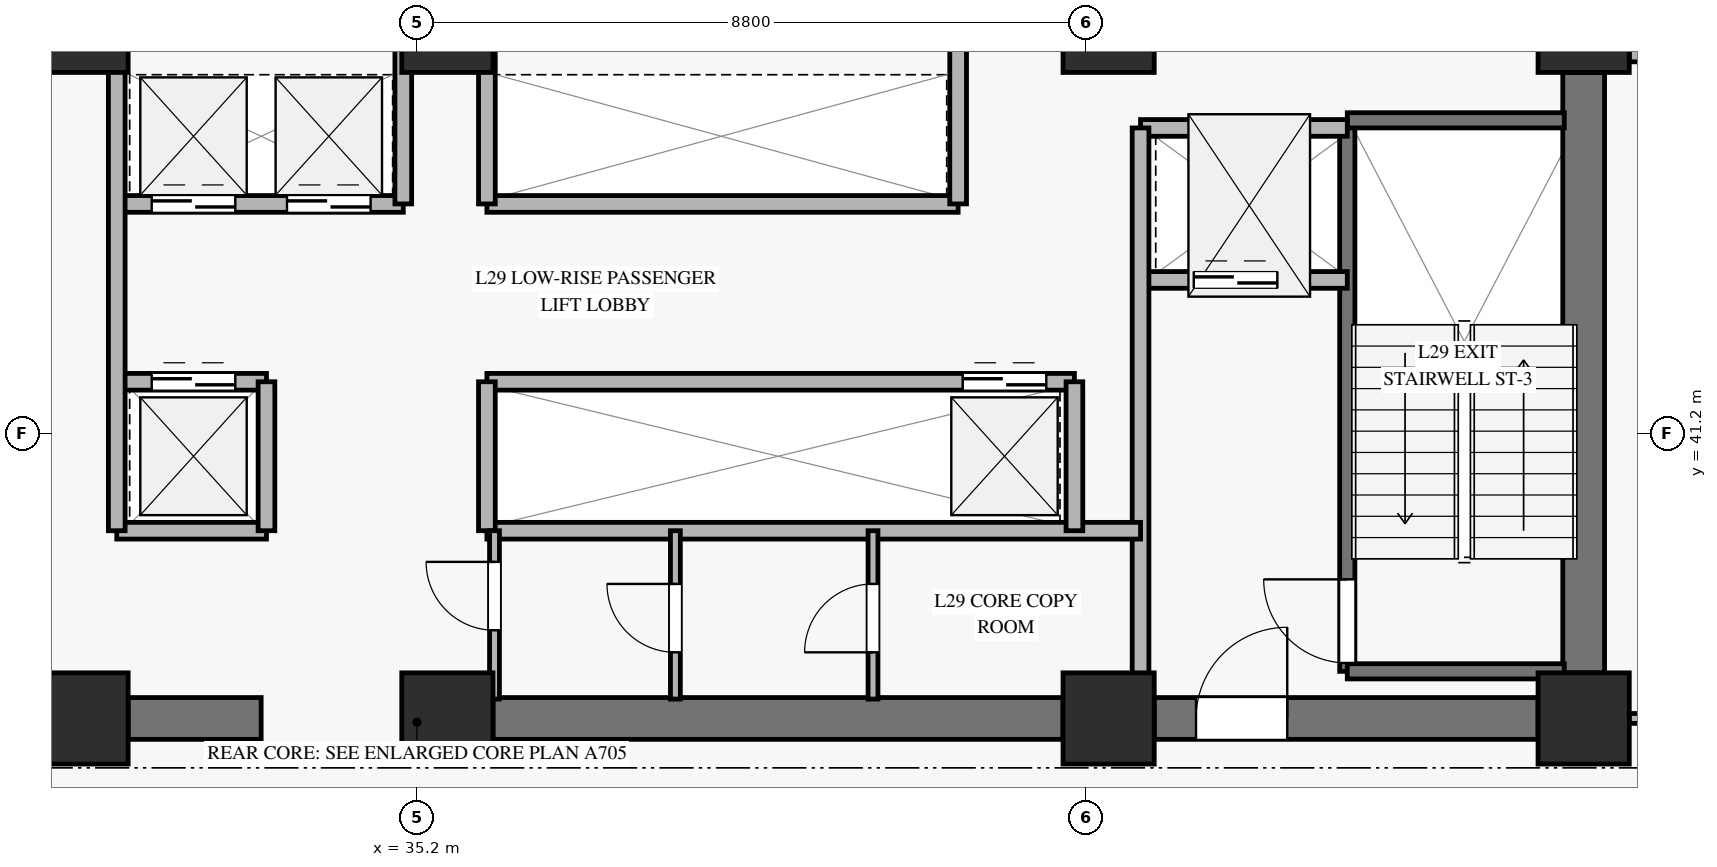
"""IFC4 building model, lengths in metres.
Left out: names, types, materials, properties, quantities, classifications, styles, units other than length and angle.
Written with IfcOpenShell. Run it as: python <this file> out.ifc"""

import sys

from ifc_helpers import new_model, si_unit, direction, frame, frame_2d, origin, origin_2d, place, context, subcontext, project, spatial, rectangle, extrude, source, transform, mapped, element, fill, save


model = new_model("IFC4")
c1 = context("Model", 3, precision=1e-05, world=origin(), true_north=direction((0.0, 1.0)))
c2 = subcontext(c1, "Body", "Model", "MODEL_VIEW")
j1 = project(units=[si_unit("LENGTHUNIT", "METRE"), si_unit("PLANEANGLEUNIT", "RADIAN")], contexts=[c1])
p1 = place(None, origin())
s1 = spatial("IfcSite", under=j1, at=p1, CompositionType="ELEMENT")
p2 = place(p1, origin())
s2 = spatial("IfcBuilding", under=s1, at=p2, CompositionType="ELEMENT")
p3 = place(p2, frame((0.0, 0.0, 119.2)))
s3 = spatial("IfcBuildingStorey", under=s2, at=p3, CompositionType="ELEMENT", Elevation=119.2)
m1 = source(origin(), c2, "Body", "SweptSolid", [
    extrude(rectangle(XDim=1.2, YDim=1.2, at=origin_2d()), origin(), (0.0, 0.0, 1.0), 3.68),
])
for number, where, z_axis, x_axis in (
    (1, (30.8, 37.45, 0.0), (0.0, 0.0, 1.0), (1.0, 0.0, 0.0)),
    (2, (30.8, 46.55, 0.0), (0.0, 0.0, 1.0), (1.0, 0.0, 0.0)),
    (3, (35.6, 37.45, 0.0), (0.0, 0.0, 1.0), (1.0, 0.0, 0.0)),
    (4, (35.6, 46.55, 0.0), (0.0, 0.0, 1.0), (1.0, 0.0, 0.0)),
    (5, (44.3, 37.45, 0.0), (0.0, 0.0, 1.0), (1.0, 0.0, 0.0)),
    (6, (44.3, 46.55, 0.0), (0.0, 0.0, 1.0), (1.0, 0.0, 0.0)),
    (7, (50.55, 37.45, 0.0), (0.0, 0.0, 1.0), (1.0, 0.0, 0.0)),
    (8, (50.55, 46.55, 0.0), (0.0, 0.0, 1.0), (1.0, 0.0, 0.0)),
):
    element("IfcColumn", number, at=place(p3, frame(where, z_axis=z_axis, x_axis=x_axis)), inside=s3, PredefinedType="PILASTER", context=c2, shape_type="MappedRepresentation", body=[
        mapped(m1, transform((0.0, 0.0, 0.0), x_axis=(1.0, 0.0, 0.0), y_axis=(0.0, 1.0, 0.0), z_axis=(0.0, 0.0, 1.0), scale=1.0)),
    ])
p4 = place(p3, frame((31.4, 37.45, 0.0), z_axis=(0.0, 0.0, 1.0), x_axis=(1.0, 0.0, 0.0)))
e9 = element("IfcWall", 9, at=p4, inside=s3, PredefinedType="SHEAR", context=c2, shape_type="SweptSolid", body=[
    extrude(rectangle(XDim=1.75, YDim=0.55, at=frame_2d((0.875, 0.0))), origin(), (0.0, 0.0, 1.0), 3.68),
])
p5 = place(p3, frame((36.2, 37.45, 0.0), z_axis=(0.0, 0.0, 1.0), x_axis=(1.0, 0.0, 0.0)))
e10 = element("IfcWall", 10, at=p5, inside=s3, PredefinedType="SHEAR", context=c2, shape_type="SweptSolid", body=[
    extrude(rectangle(XDim=7.5, YDim=0.55, at=frame_2d((3.75, 0.0))), origin(), (0.0, 0.0, 1.0), 3.68),
])
p6 = place(p3, frame((44.9, 37.45, 0.0), z_axis=(0.0, 0.0, 1.0), x_axis=(1.0, 0.0, 0.0)))
e11 = element("IfcWall", 11, at=p6, inside=s3, PredefinedType="SHEAR", context=c2, shape_type="SweptSolid", body=[
    extrude(rectangle(XDim=5.05, YDim=0.55, at=frame_2d((2.525, 0.0))), origin(), (0.0, 0.0, 1.0), 3.68),
])
p7 = place(p6, frame((0.55, 0.0, 0.0)))
e12 = element("IfcOpeningElement", 12, at=p7, cuts=e11, PredefinedType="OPENING", context=c2, shape_type="SweptSolid", body=[
    extrude(rectangle(XDim=1.2, YDim=2.15, at=frame_2d((0.6, 1.075))), frame((0.0, 0.285, 0.0), z_axis=(0.0, -1.0, 0.0), x_axis=(1.0, 0.0, 0.0)), (0.0, 0.0, 1.0), 0.57),
])
p8 = place(p3, frame((50.55, 38.05, 0.0), z_axis=(0.0, 0.0, 1.0), x_axis=(0.0, 1.0, 0.0)))
e13 = element("IfcWall", 13, at=p8, inside=s3, PredefinedType="SHEAR", context=c2, shape_type="SweptSolid", body=[
    extrude(rectangle(XDim=7.9, YDim=0.55, at=frame_2d((3.95, 0.0))), origin(), (0.0, 0.0, 1.0), 3.68),
])
p9 = place(p3, frame((51.15, 46.25, 0.0), z_axis=(0.0, 0.0, 1.0), x_axis=(1.0, 0.0, 0.0)))
e14 = element("IfcWall", 14, at=p9, inside=s3, PredefinedType="SOLIDWALL", context=c2, shape_type="SweptSolid", body=[
    extrude(rectangle(XDim=11.039, YDim=0.32, at=frame_2d((5.52, 0.0))), origin(), (0.0, 0.0, 1.0), 3.16),
])
p10 = place(p9, frame((4.72, 0.0, 0.45)))
e15 = element("IfcOpeningElement", 15, at=p10, cuts=e14, PredefinedType="OPENING", context=c2, shape_type="SweptSolid", body=[
    extrude(rectangle(XDim=1.6, YDim=2.0, at=frame_2d((0.8, 1.0))), frame((0.0, 0.17, 0.0), z_axis=(0.0, -1.0, 0.0), x_axis=(1.0, 0.0, 0.0)), (0.0, 0.0, 1.0), 0.34),
])
p11 = place(p3, frame((47.44, 38.07, 0.0), z_axis=(0.0, 0.0, 1.0), x_axis=(0.0, 1.0, 0.0)))
e16 = element("IfcWall", 16, at=p11, inside=s3, PredefinedType="SOLIDWALL", context=c2, shape_type="SweptSolid", body=[
    extrude(rectangle(XDim=7.25, YDim=0.2, at=frame_2d((3.625, 0.0))), origin(), (0.0, 0.0, 1.0), 3.9),
])
p12 = place(p11, frame((0.11, 0.0, 0.0)))
e17 = element("IfcOpeningElement", 17, at=p12, cuts=e16, PredefinedType="OPENING", context=c2, shape_type="SweptSolid", body=[
    extrude(rectangle(XDim=1.1, YDim=2.15, at=frame_2d((0.55, 1.075))), frame((0.0, 0.11, 0.0), z_axis=(0.0, -1.0, 0.0), x_axis=(1.0, 0.0, 0.0)), (0.0, 0.0, 1.0), 0.22),
])
for number, where, z_axis, x_axis in (
    (18, (47.44, 45.32, 0.0), (0.0, 0.0, 1.0), (1.0, 0.0, 0.0)),
    (19, (47.44, 38.07, 0.0), (0.0, 0.0, 1.0), (1.0, 0.0, 0.0)),
):
    element("IfcWall", number, at=place(p3, frame(where, z_axis=z_axis, x_axis=x_axis)), inside=s3, PredefinedType="SOLIDWALL", context=c2, shape_type="SweptSolid", body=[
        extrude(rectangle(XDim=2.855, YDim=0.2, at=frame_2d((1.427, 0.0))), origin(), (0.0, 0.0, 1.0), 3.9),
    ])
p13 = place(p3, frame((44.72, 43.22, 0.0), z_axis=(0.0, 0.0, 1.0), x_axis=(1.0, 0.0, 0.0)))
e20 = element("IfcWall", 20, at=p13, inside=s3, PredefinedType="SOLIDWALL", context=c2, shape_type="SweptSolid", body=[
    extrude(rectangle(XDim=2.72, YDim=0.22, at=frame_2d((1.36, 0.0))), origin(), (0.0, 0.0, 1.0), 3.68),
])
p14 = place(p13, frame((0.7, 0.0, 0.0)))
e21 = element("IfcOpeningElement", 21, at=p14, cuts=e20, PredefinedType="OPENING", context=c2, shape_type="SweptSolid", body=[
    extrude(rectangle(XDim=1.1, YDim=2.2, at=frame_2d((0.55, 1.1))), frame((0.0, 0.12, 0.0), z_axis=(0.0, -1.0, 0.0), x_axis=(1.0, 0.0, 0.0)), (0.0, 0.0, 1.0), 0.24),
])
p15 = place(p3, frame((44.72, 45.22, 0.0), z_axis=(0.0, 0.0, 1.0), x_axis=(1.0, 0.0, 0.0)))
e22 = element("IfcWall", 22, at=p15, inside=s3, PredefinedType="SOLIDWALL", context=c2, shape_type="SweptSolid", body=[
    extrude(rectangle(XDim=2.72, YDim=0.22, at=frame_2d((1.36, 0.0))), origin(), (0.0, 0.0, 1.0), 3.68),
])
p16 = place(p3, frame((44.72, 37.705, 0.0), z_axis=(0.0, 0.0, 1.0), x_axis=(0.0, 1.0, 0.0)))
e23 = element("IfcWall", 23, at=p16, inside=s3, PredefinedType="SOLIDWALL", context=c2, shape_type="SweptSolid", body=[
    extrude(rectangle(XDim=7.515, YDim=0.22, at=frame_2d((3.757, 0.0))), origin(), (0.0, 0.0, 1.0), 3.68),
])
p17 = place(p3, frame((31.25, 44.22, 0.0), z_axis=(0.0, 0.0, 1.0), x_axis=(1.0, 0.0, 0.0)))
e24 = element("IfcWall", 24, at=p17, inside=s3, PredefinedType="SOLIDWALL", context=c2, shape_type="SweptSolid", body=[
    extrude(rectangle(XDim=3.77, YDim=0.22, at=frame_2d((1.885, 0.0))), origin(), (0.0, 0.0, 1.0), 3.68),
])
p18 = place(p17, frame((0.46, 0.0, 0.0)))
e25 = element("IfcOpeningElement", 25, at=p18, cuts=e24, PredefinedType="OPENING", context=c2, shape_type="SweptSolid", body=[
    extrude(rectangle(XDim=1.1, YDim=2.2, at=frame_2d((0.55, 1.1))), frame((0.0, 0.12, 0.0), z_axis=(0.0, -1.0, 0.0), x_axis=(1.0, 0.0, 0.0)), (0.0, 0.0, 1.0), 0.24),
])
p19 = place(p17, frame((2.24, 0.0, 0.0)))
e26 = element("IfcOpeningElement", 26, at=p19, cuts=e24, PredefinedType="OPENING", context=c2, shape_type="SweptSolid", body=[
    extrude(rectangle(XDim=1.1, YDim=2.2, at=frame_2d((0.55, 1.1))), frame((0.0, 0.12, 0.0), z_axis=(0.0, -1.0, 0.0), x_axis=(1.0, 0.0, 0.0)), (0.0, 0.0, 1.0), 0.24),
])
p20 = place(p3, frame((36.12, 44.22, 0.0), z_axis=(0.0, 0.0, 1.0), x_axis=(1.0, 0.0, 0.0)))
e27 = element("IfcWall", 27, at=p20, inside=s3, PredefinedType="SOLIDWALL", context=c2, shape_type="SweptSolid", body=[
    extrude(rectangle(XDim=6.2, YDim=0.22, at=frame_2d((3.1, 0.0))), origin(), (0.0, 0.0, 1.0), 3.68),
])
for number, where, z_axis, x_axis in (
    (28, (35.02, 44.22, 0.0), (0.0, 0.0, 1.0), (0.0, 1.0, 0.0)),
    (29, (36.12, 44.22, 0.0), (0.0, 0.0, 1.0), (0.0, 1.0, 0.0)),
    (30, (42.32, 44.22, 0.0), (0.0, 0.0, 1.0), (0.0, 1.0, 0.0)),
):
    element("IfcWall", number, at=place(p3, frame(where, z_axis=z_axis, x_axis=x_axis)), inside=s3, PredefinedType="SOLIDWALL", context=c2, shape_type="SweptSolid", body=[
        extrude(rectangle(XDim=2.075, YDim=0.22, at=frame_2d((1.038, 0.0))), origin(), (0.0, 0.0, 1.0), 3.68),
    ])
p21 = place(p3, frame((31.25, 41.88, 0.0), z_axis=(0.0, 0.0, 1.0), x_axis=(1.0, 0.0, 0.0)))
e31 = element("IfcWall", 31, at=p21, inside=s3, PredefinedType="SOLIDWALL", context=c2, shape_type="SweptSolid", body=[
    extrude(rectangle(XDim=1.97, YDim=0.22, at=frame_2d((0.985, 0.0))), origin(), (0.0, 0.0, 1.0), 3.68),
])
p22 = place(p21, frame((0.46, 0.0, 0.0)))
e32 = element("IfcOpeningElement", 32, at=p22, cuts=e31, PredefinedType="OPENING", context=c2, shape_type="SweptSolid", body=[
    extrude(rectangle(XDim=1.1, YDim=2.2, at=frame_2d((0.55, 1.1))), frame((0.0, 0.12, 0.0), z_axis=(0.0, -1.0, 0.0), x_axis=(1.0, 0.0, 0.0)), (0.0, 0.0, 1.0), 0.24),
])
p23 = place(p3, frame((36.12, 41.88, 0.0), z_axis=(0.0, 0.0, 1.0), x_axis=(1.0, 0.0, 0.0)))
e33 = element("IfcWall", 33, at=p23, inside=s3, PredefinedType="SOLIDWALL", context=c2, shape_type="SweptSolid", body=[
    extrude(rectangle(XDim=7.73, YDim=0.22, at=frame_2d((3.865, 0.0))), origin(), (0.0, 0.0, 1.0), 3.68),
])
p24 = place(p23, frame((6.26, 0.0, 0.0)))
e34 = element("IfcOpeningElement", 34, at=p24, cuts=e33, PredefinedType="OPENING", context=c2, shape_type="SweptSolid", body=[
    extrude(rectangle(XDim=1.1, YDim=2.2, at=frame_2d((0.55, 1.1))), frame((0.0, 0.12, 0.0), z_axis=(0.0, -1.0, 0.0), x_axis=(1.0, 0.0, 0.0)), (0.0, 0.0, 1.0), 0.24),
])
p25 = place(p3, frame((31.25, 39.92, 0.0), z_axis=(0.0, 0.0, 1.0), x_axis=(1.0, 0.0, 0.0)))
e35 = element("IfcWall", 35, at=p25, inside=s3, PredefinedType="SOLIDWALL", context=c2, shape_type="SweptSolid", body=[
    extrude(rectangle(XDim=1.97, YDim=0.22, at=frame_2d((0.985, 0.0))), origin(), (0.0, 0.0, 1.0), 3.68),
])
p26 = place(p3, frame((33.22, 39.92, 0.0), z_axis=(0.0, 0.0, 1.0), x_axis=(0.0, 1.0, 0.0)))
e36 = element("IfcWall", 36, at=p26, inside=s3, PredefinedType="SOLIDWALL", context=c2, shape_type="SweptSolid", body=[
    extrude(rectangle(XDim=1.96, YDim=0.22, at=frame_2d((0.98, 0.0))), origin(), (0.0, 0.0, 1.0), 3.68),
])
p27 = place(p3, frame((36.12, 39.92, 0.0), z_axis=(0.0, 0.0, 1.0), x_axis=(1.0, 0.0, 0.0)))
e37 = element("IfcWall", 37, at=p27, inside=s3, PredefinedType="SOLIDWALL", context=c2, shape_type="SweptSolid", body=[
    extrude(rectangle(XDim=8.6, YDim=0.22, at=frame_2d((4.3, 0.0))), origin(), (0.0, 0.0, 1.0), 2.965),
])
p28 = place(p3, frame((36.12, 39.92, 0.0), z_axis=(0.0, 0.0, 1.0), x_axis=(0.0, 1.0, 0.0)))
e38 = element("IfcWall", 38, at=p28, inside=s3, PredefinedType="SOLIDWALL", context=c2, shape_type="SweptSolid", body=[
    extrude(rectangle(XDim=1.96, YDim=0.22, at=frame_2d((0.98, 0.0))), origin(), (0.0, 0.0, 1.0), 3.68),
])
p29 = place(p3, frame((31.25, 39.92, 0.0), z_axis=(0.0, 0.0, 1.0), x_axis=(0.0, 1.0, 0.0)))
e39 = element("IfcWall", 39, at=p29, inside=s3, PredefinedType="SOLIDWALL", context=c2, shape_type="SweptSolid", body=[
    extrude(rectangle(XDim=6.375, YDim=0.22, at=frame_2d((3.188, 0.0))), origin(), (0.0, 0.0, 1.0), 3.68),
])
p30 = place(p3, frame((43.85, 39.92, 0.0), z_axis=(0.0, 0.0, 1.0), x_axis=(0.0, 1.0, 0.0)))
e40 = element("IfcWall", 40, at=p30, inside=s3, PredefinedType="SOLIDWALL", context=c2, shape_type="SweptSolid", body=[
    extrude(rectangle(XDim=1.96, YDim=0.22, at=frame_2d((0.98, 0.0))), origin(), (0.0, 0.0, 1.0), 3.68),
])
p31 = place(p3, frame((36.22, 37.705, 0.0), z_axis=(0.0, 0.0, 1.0), x_axis=(0.0, 1.0, 0.0)))
e41 = element("IfcWall", 41, at=p31, inside=s3, PredefinedType="PARTITIONING", context=c2, shape_type="SweptSolid", body=[
    extrude(rectangle(XDim=2.215, YDim=0.13, at=frame_2d((1.107, 0.0))), origin(), (0.0, 0.0, 1.0), 3.68),
])
p32 = place(p31, frame((0.905, 0.0, 0.0)))
e42 = element("IfcOpeningElement", 42, at=p32, cuts=e41, PredefinedType="OPENING", context=c2, shape_type="SweptSolid", body=[
    extrude(rectangle(XDim=0.9, YDim=2.1, at=frame_2d((0.45, 1.05))), frame((0.0, 0.075, 0.0), z_axis=(0.0, -1.0, 0.0), x_axis=(1.0, 0.0, 0.0)), (0.0, 0.0, 1.0), 0.15),
])
p33 = place(p3, frame((38.6, 37.705, 0.0), z_axis=(0.0, 0.0, 1.0), x_axis=(0.0, 1.0, 0.0)))
e43 = element("IfcWall", 43, at=p33, inside=s3, PredefinedType="PARTITIONING", context=c2, shape_type="SweptSolid", body=[
    extrude(rectangle(XDim=2.215, YDim=0.13, at=frame_2d((1.107, 0.0))), origin(), (0.0, 0.0, 1.0), 3.68),
])
p34 = place(p33, frame((0.615, 0.0, 0.0)))
e44 = element("IfcOpeningElement", 44, at=p34, cuts=e43, PredefinedType="OPENING", context=c2, shape_type="SweptSolid", body=[
    extrude(rectangle(XDim=0.9, YDim=2.1, at=frame_2d((0.45, 1.05))), frame((0.0, 0.075, 0.0), z_axis=(0.0, -1.0, 0.0), x_axis=(1.0, 0.0, 0.0)), (0.0, 0.0, 1.0), 0.15),
])
p35 = place(p3, frame((41.2, 37.705, 0.0), z_axis=(0.0, 0.0, 1.0), x_axis=(0.0, 1.0, 0.0)))
e45 = element("IfcWall", 45, at=p35, inside=s3, PredefinedType="PARTITIONING", context=c2, shape_type="SweptSolid", body=[
    extrude(rectangle(XDim=2.215, YDim=0.13, at=frame_2d((1.107, 0.0))), origin(), (0.0, 0.0, 1.0), 3.68),
])
p36 = place(p35, frame((0.615, 0.0, 0.0)))
e46 = element("IfcOpeningElement", 46, at=p36, cuts=e45, PredefinedType="OPENING", context=c2, shape_type="SweptSolid", body=[
    extrude(rectangle(XDim=0.9, YDim=2.1, at=frame_2d((0.45, 1.05))), frame((0.0, 0.075, 0.0), z_axis=(0.0, -1.0, 0.0), x_axis=(1.0, 0.0, 0.0)), (0.0, 0.0, 1.0), 0.15),
])
p37 = place(p3, frame((51.15, 37.45, 0.0), z_axis=(0.0, 0.0, 1.0), x_axis=(1.0, 0.0, 0.0)))
e47 = element("IfcWall", 47, at=p37, inside=s3, PredefinedType="PARTITIONING", context=c2, shape_type="SweptSolid", body=[
    extrude(rectangle(XDim=14.506, YDim=0.13, at=frame_2d((7.253, 0.0))), origin(), (0.0, 0.0, 1.0), 3.165),
])
p38 = place(p37, frame((0.5, 0.0, 0.0)))
e48 = element("IfcOpeningElement", 48, at=p38, cuts=e47, PredefinedType="OPENING", context=c2, shape_type="SweptSolid", body=[
    extrude(rectangle(XDim=0.9, YDim=2.1, at=frame_2d((0.45, 1.05))), frame((0.0, 0.075, 0.0), z_axis=(0.0, -1.0, 0.0), x_axis=(1.0, 0.0, 0.0)), (0.0, 0.0, 1.0), 0.15),
])
p39 = place(p37, frame((10.43, 0.0, 0.0)))
e49 = element("IfcOpeningElement", 49, at=p39, cuts=e47, PredefinedType="OPENING", context=c2, shape_type="SweptSolid", body=[
    extrude(rectangle(XDim=0.95, YDim=2.1, at=frame_2d((0.475, 1.05))), frame((0.0, 0.075, 0.0), z_axis=(0.0, -1.0, 0.0), x_axis=(1.0, 0.0, 0.0)), (0.0, 0.0, 1.0), 0.15),
])
m2 = source(origin(), c2, "Body", "SweptSolid", [
    extrude(rectangle(XDim=1.1, YDim=2.15, at=frame_2d((0.55, 1.075))), frame((0.0, 0.025, 0.0), z_axis=(0.0, -1.0, 0.0), x_axis=(1.0, 0.0, 0.0)), (0.0, 0.0, 1.0), 0.05),
])
p40 = place(p12, origin())
e50 = element("IfcDoor", 50, at=p40, inside=s3, OperationType="SINGLE_SWING_RIGHT", PredefinedType="DOOR", context=c2, shape_type="MappedRepresentation", body=[
    mapped(m2, transform((0.0, 0.0, 0.0), x_axis=(1.0, 0.0, 0.0), y_axis=(0.0, 1.0, 0.0), z_axis=(0.0, 0.0, 1.0), scale=1.0)),
])
fill(e17, e50)
m3 = source(origin(), c2, "Body", "SweptSolid", [
    extrude(rectangle(XDim=1.1, YDim=2.2, at=frame_2d((0.55, 1.1))), frame((0.0, 0.025, 0.0), z_axis=(0.0, -1.0, 0.0), x_axis=(1.0, 0.0, 0.0)), (0.0, 0.0, 1.0), 0.05),
])
p41 = place(p14, origin())
e51 = element("IfcDoor", 51, at=p41, inside=s3, OperationType="SLIDING_TO_LEFT", PredefinedType="DOOR", context=c2, shape_type="MappedRepresentation", body=[
    mapped(m3, transform((0.0, 0.0, 0.0), x_axis=(1.0, 0.0, 0.0), y_axis=(0.0, 1.0, 0.0), z_axis=(0.0, 0.0, 1.0), scale=1.0)),
])
fill(e21, e51)
m4 = source(origin(), c2, "Body", "SweptSolid", [
    extrude(rectangle(XDim=1.2, YDim=2.15, at=frame_2d((0.6, 1.075))), frame((0.0, 0.025, 0.0), z_axis=(0.0, -1.0, 0.0), x_axis=(1.0, 0.0, 0.0)), (0.0, 0.0, 1.0), 0.05),
])
p42 = place(p7, origin())
e52 = element("IfcDoor", 52, at=p42, inside=s3, OperationType="SINGLE_SWING_RIGHT", PredefinedType="DOOR", context=c2, shape_type="MappedRepresentation", body=[
    mapped(m4, transform((0.0, 0.0, 0.0), x_axis=(1.0, 0.0, 0.0), y_axis=(0.0, 1.0, 0.0), z_axis=(0.0, 0.0, 1.0), scale=1.0)),
])
fill(e12, e52)
p43 = place(p18, origin())
e53 = element("IfcDoor", 53, at=p43, inside=s3, OperationType="SLIDING_TO_LEFT", PredefinedType="DOOR", context=c2, shape_type="MappedRepresentation", body=[
    mapped(m3, transform((0.0, 0.0, 0.0), x_axis=(1.0, 0.0, 0.0), y_axis=(0.0, 1.0, 0.0), z_axis=(0.0, 0.0, 1.0), scale=1.0)),
])
fill(e25, e53)
p44 = place(p19, origin())
e54 = element("IfcDoor", 54, at=p44, inside=s3, OperationType="SLIDING_TO_LEFT", PredefinedType="DOOR", context=c2, shape_type="MappedRepresentation", body=[
    mapped(m3, transform((0.0, 0.0, 0.0), x_axis=(1.0, 0.0, 0.0), y_axis=(0.0, 1.0, 0.0), z_axis=(0.0, 0.0, 1.0), scale=1.0)),
])
fill(e26, e54)
p45 = place(p22, origin())
e55 = element("IfcDoor", 55, at=p45, inside=s3, OperationType="SLIDING_TO_LEFT", PredefinedType="DOOR", context=c2, shape_type="MappedRepresentation", body=[
    mapped(m3, transform((0.0, 0.0, 0.0), x_axis=(1.0, 0.0, 0.0), y_axis=(0.0, 1.0, 0.0), z_axis=(0.0, 0.0, 1.0), scale=1.0)),
])
fill(e32, e55)
p46 = place(p24, origin())
e56 = element("IfcDoor", 56, at=p46, inside=s3, OperationType="SLIDING_TO_LEFT", PredefinedType="DOOR", context=c2, shape_type="MappedRepresentation", body=[
    mapped(m3, transform((0.0, 0.0, 0.0), x_axis=(1.0, 0.0, 0.0), y_axis=(0.0, 1.0, 0.0), z_axis=(0.0, 0.0, 1.0), scale=1.0)),
])
fill(e34, e56)
m5 = source(origin(), c2, "Body", "SweptSolid", [
    extrude(rectangle(XDim=0.9, YDim=2.1, at=frame_2d((0.45, 1.05))), frame((0.0, 0.025, 0.0), z_axis=(0.0, -1.0, 0.0), x_axis=(1.0, 0.0, 0.0)), (0.0, 0.0, 1.0), 0.05),
])
p47 = place(p32, origin())
e57 = element("IfcDoor", 57, at=p47, inside=s3, OperationType="SINGLE_SWING_RIGHT", PredefinedType="DOOR", context=c2, shape_type="MappedRepresentation", body=[
    mapped(m5, transform((0.0, 0.0, 0.0), x_axis=(1.0, 0.0, 0.0), y_axis=(0.0, 1.0, 0.0), z_axis=(0.0, 0.0, 1.0), scale=1.0)),
])
fill(e42, e57)
p48 = place(p34, origin())
e58 = element("IfcDoor", 58, at=p48, inside=s3, OperationType="SINGLE_SWING_RIGHT", PredefinedType="DOOR", context=c2, shape_type="MappedRepresentation", body=[
    mapped(m5, transform((0.0, 0.0, 0.0), x_axis=(1.0, 0.0, 0.0), y_axis=(0.0, 1.0, 0.0), z_axis=(0.0, 0.0, 1.0), scale=1.0)),
])
fill(e44, e58)
p49 = place(p36, origin())
e59 = element("IfcDoor", 59, at=p49, inside=s3, OperationType="SINGLE_SWING_LEFT", PredefinedType="DOOR", context=c2, shape_type="MappedRepresentation", body=[
    mapped(m5, transform((0.0, 0.0, 0.0), x_axis=(1.0, 0.0, 0.0), y_axis=(0.0, 1.0, 0.0), z_axis=(0.0, 0.0, 1.0), scale=1.0)),
])
fill(e46, e59)
save(model, sys.argv[1])
